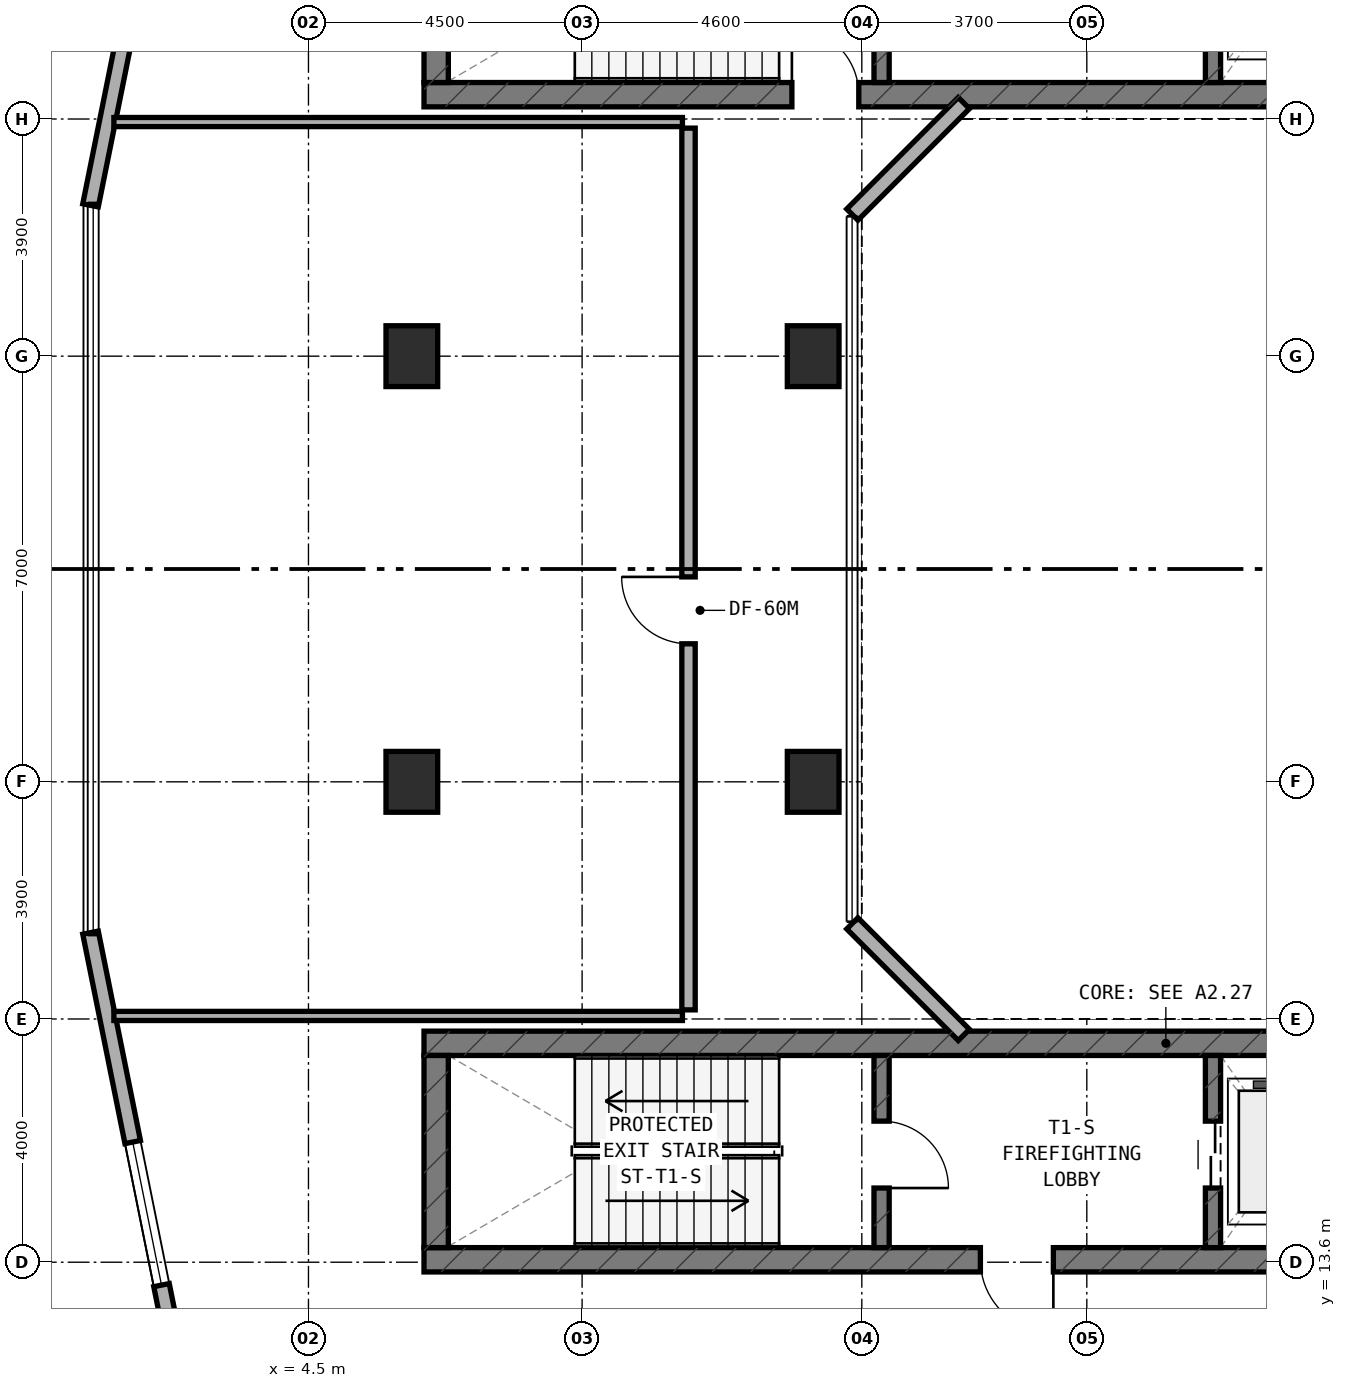
"""IFC4 building model, lengths in metres.
Left out: names, types, materials, properties, quantities, classifications, styles, units other than length and angle.
Written with IfcOpenShell. Run it as: python <this file> out.ifc"""

import sys

from ifc_helpers import new_model, si_unit, direction, frame, frame_2d, origin, origin_2d, place, context, subcontext, project, spatial, rectangle, extrude, element, fill, save


model = new_model("IFC4")
c1 = context("Model", 3, precision=1e-05, world=origin(), true_north=direction((0.0, 1.0)))
c2 = subcontext(c1, "Body", "Model", "MODEL_VIEW")
j1 = project(units=[si_unit("LENGTHUNIT", "METRE"), si_unit("PLANEANGLEUNIT", "RADIAN")], contexts=[c1])
p1 = place(None, origin())
s1 = spatial("IfcSite", under=j1, at=p1, CompositionType="ELEMENT")
p2 = place(p1, origin())
s2 = spatial("IfcBuilding", under=s1, at=p2, CompositionType="ELEMENT")
p3 = place(p2, frame((0.0, 0.0, 119.5)))
s3 = spatial("IfcBuildingStorey", under=s2, at=p3, CompositionType="ELEMENT", Elevation=119.5)
p4 = place(p3, frame((6.4, 32.8, 0.0), z_axis=(0.0, 0.0, 1.0), x_axis=(1.0, 0.0, 0.0)))
e1 = element("IfcWall", 1, at=p4, inside=s3, PredefinedType="SHEAR", context=c2, shape_type="SweptSolid", body=[
    extrude(rectangle(XDim=24.4, YDim=0.4, at=frame_2d((12.2, 0.0))), origin(), (0.0, 0.0, 1.0), 4.5),
])
p5 = place(p4, frame((6.05, 0.0, 0.0)))
e2 = element("IfcOpeningElement", 2, at=p5, cuts=e1, PredefinedType="OPENING", context=c2, shape_type="SweptSolid", body=[
    extrude(rectangle(XDim=1.1, YDim=2.15, at=frame_2d((0.55, 1.075))), frame((0.0, 0.21, 0.0), z_axis=(0.0, -1.0, 0.0), x_axis=(1.0, 0.0, 0.0)), (0.0, 0.0, 1.0), 0.42),
])
p6 = place(p3, frame((6.6, 33.0, 0.0), z_axis=(0.0, 0.0, 1.0), x_axis=(0.0, 1.0, 0.0)))
e3 = element("IfcWall", 3, at=p6, inside=s3, PredefinedType="SHEAR", context=c2, shape_type="SweptSolid", body=[
    extrude(rectangle(XDim=3.16, YDim=0.4, at=frame_2d((1.58, 0.0))), origin(), (0.0, 0.0, 1.0), 4.5),
])
p7 = place(p3, frame((13.925, 33.0, 0.0), z_axis=(0.0, 0.0, 1.0), x_axis=(0.0, 1.0, 0.0)))
e4 = element("IfcWall", 4, at=p7, inside=s3, PredefinedType="STANDARD", context=c2, shape_type="SweptSolid", body=[
    extrude(rectangle(XDim=3.16, YDim=0.25, at=frame_2d((1.58, 0.0))), origin(), (0.0, 0.0, 1.0), 4.22),
])
p8 = place(p7, frame((0.98, 0.0, 0.0)))
e5 = element("IfcOpeningElement", 5, at=p8, cuts=e4, PredefinedType="OPENING", context=c2, shape_type="SweptSolid", body=[
    extrude(rectangle(XDim=1.1, YDim=2.15, at=frame_2d((0.55, 1.075))), frame((0.0, 0.135, 0.0), z_axis=(0.0, -1.0, 0.0), x_axis=(1.0, 0.0, 0.0)), (0.0, 0.0, 1.0), 0.27),
])
p9 = place(p3, frame((19.375, 33.0, 0.0), z_axis=(0.0, 0.0, 1.0), x_axis=(0.0, 1.0, 0.0)))
e6 = element("IfcWall", 6, at=p9, inside=s3, PredefinedType="STANDARD", context=c2, shape_type="SweptSolid", body=[
    extrude(rectangle(XDim=3.16, YDim=0.25, at=frame_2d((1.58, 0.0))), origin(), (0.0, 0.0, 1.0), 4.22),
])
p10 = place(p9, frame((0.98, 0.0, 0.0)))
e7 = element("IfcOpeningElement", 7, at=p10, cuts=e6, PredefinedType="OPENING", context=c2, shape_type="SweptSolid", body=[
    extrude(rectangle(XDim=1.1, YDim=2.15, at=frame_2d((0.55, 1.075))), frame((0.0, 0.135, 0.0), z_axis=(0.0, -1.0, 0.0), x_axis=(1.0, 0.0, 0.0)), (0.0, 0.0, 1.0), 0.27),
])
p11 = place(p3, frame((6.4, 13.64, 0.0), z_axis=(0.0, 0.0, 1.0), x_axis=(1.0, 0.0, 0.0)))
e8 = element("IfcWall", 8, at=p11, inside=s3, PredefinedType="SHEAR", context=c2, shape_type="SweptSolid", body=[
    extrude(rectangle(XDim=24.4, YDim=0.4, at=frame_2d((12.2, 0.0))), origin(), (0.0, 0.0, 1.0), 4.5),
])
p12 = place(p11, frame((9.15, 0.0, 0.0)))
e9 = element("IfcOpeningElement", 9, at=p12, cuts=e8, PredefinedType="OPENING", context=c2, shape_type="SweptSolid", body=[
    extrude(rectangle(XDim=1.2, YDim=2.15, at=frame_2d((0.6, 1.075))), frame((0.0, 0.21, 0.0), z_axis=(0.0, -1.0, 0.0), x_axis=(1.0, 0.0, 0.0)), (0.0, 0.0, 1.0), 0.42),
])
p13 = place(p11, frame((16.94, 0.0, 0.0)))
e10 = element("IfcOpeningElement", 10, at=p13, cuts=e8, PredefinedType="OPENING", context=c2, shape_type="SweptSolid", body=[
    extrude(rectangle(XDim=0.85, YDim=2.1, at=frame_2d((0.425, 1.05))), frame((0.0, 0.21, 0.0), z_axis=(0.0, -1.0, 0.0), x_axis=(1.0, 0.0, 0.0)), (0.0, 0.0, 1.0), 0.42),
])
p14 = place(p11, frame((18.783, 0.0, 0.0)))
e11 = element("IfcOpeningElement", 11, at=p14, cuts=e8, PredefinedType="OPENING", context=c2, shape_type="SweptSolid", body=[
    extrude(rectangle(XDim=1.1, YDim=2.15, at=frame_2d((0.55, 1.075))), frame((0.0, 0.21, 0.0), z_axis=(0.0, -1.0, 0.0), x_axis=(1.0, 0.0, 0.0)), (0.0, 0.0, 1.0), 0.42),
])
p15 = place(p11, frame((20.65, 0.0, 0.0)))
e12 = element("IfcOpeningElement", 12, at=p15, cuts=e8, PredefinedType="OPENING", context=c2, shape_type="SweptSolid", body=[
    extrude(rectangle(XDim=1.1, YDim=2.15, at=frame_2d((0.55, 1.075))), frame((0.0, 0.21, 0.0), z_axis=(0.0, -1.0, 0.0), x_axis=(1.0, 0.0, 0.0)), (0.0, 0.0, 1.0), 0.42),
])
p16 = place(p11, frame((22.517, 0.0, 0.0)))
e13 = element("IfcOpeningElement", 13, at=p16, cuts=e8, PredefinedType="OPENING", context=c2, shape_type="SweptSolid", body=[
    extrude(rectangle(XDim=1.1, YDim=2.15, at=frame_2d((0.55, 1.075))), frame((0.0, 0.21, 0.0), z_axis=(0.0, -1.0, 0.0), x_axis=(1.0, 0.0, 0.0)), (0.0, 0.0, 1.0), 0.42),
])
p17 = place(p3, frame((6.4, 17.2, 0.0), z_axis=(0.0, 0.0, 1.0), x_axis=(1.0, 0.0, 0.0)))
e14 = element("IfcWall", 14, at=p17, inside=s3, PredefinedType="SHEAR", context=c2, shape_type="SweptSolid", body=[
    extrude(rectangle(XDim=24.4, YDim=0.4, at=frame_2d((12.2, 0.0))), origin(), (0.0, 0.0, 1.0), 4.5),
])
p18 = place(p3, frame((6.6, 13.84, 0.0), z_axis=(0.0, 0.0, 1.0), x_axis=(0.0, 1.0, 0.0)))
e15 = element("IfcWall", 15, at=p18, inside=s3, PredefinedType="SHEAR", context=c2, shape_type="SweptSolid", body=[
    extrude(rectangle(XDim=3.16, YDim=0.4, at=frame_2d((1.58, 0.0))), origin(), (0.0, 0.0, 1.0), 4.5),
])
p19 = place(p3, frame((13.925, 13.84, 0.0), z_axis=(0.0, 0.0, 1.0), x_axis=(0.0, 1.0, 0.0)))
e16 = element("IfcWall", 16, at=p19, inside=s3, PredefinedType="STANDARD", context=c2, shape_type="SweptSolid", body=[
    extrude(rectangle(XDim=3.16, YDim=0.25, at=frame_2d((1.58, 0.0))), origin(), (0.0, 0.0, 1.0), 4.22),
])
p20 = place(p19, frame((0.98, 0.0, 0.0)))
e17 = element("IfcOpeningElement", 17, at=p20, cuts=e16, PredefinedType="OPENING", context=c2, shape_type="SweptSolid", body=[
    extrude(rectangle(XDim=1.1, YDim=2.15, at=frame_2d((0.55, 1.075))), frame((0.0, 0.135, 0.0), z_axis=(0.0, -1.0, 0.0), x_axis=(1.0, 0.0, 0.0)), (0.0, 0.0, 1.0), 0.27),
])
p21 = place(p3, frame((19.375, 13.84, 0.0), z_axis=(0.0, 0.0, 1.0), x_axis=(0.0, 1.0, 0.0)))
e18 = element("IfcWall", 18, at=p21, inside=s3, PredefinedType="STANDARD", context=c2, shape_type="SweptSolid", body=[
    extrude(rectangle(XDim=3.16, YDim=0.25, at=frame_2d((1.58, 0.0))), origin(), (0.0, 0.0, 1.0), 4.22),
])
p22 = place(p21, frame((0.98, 0.0, 0.0)))
e19 = element("IfcOpeningElement", 19, at=p22, cuts=e18, PredefinedType="OPENING", context=c2, shape_type="SweptSolid", body=[
    extrude(rectangle(XDim=1.1, YDim=2.15, at=frame_2d((0.55, 1.075))), frame((0.0, 0.135, 0.0), z_axis=(0.0, -1.0, 0.0), x_axis=(1.0, 0.0, 0.0)), (0.0, 0.0, 1.0), 0.27),
])
for number, where, z_axis, x_axis in (
    (20, (6.2, 21.5, 0.0), (0.0, 0.0, 1.0), (1.0, 0.0, 0.0)),
    (21, (6.2, 28.5, 0.0), (0.0, 0.0, 1.0), (1.0, 0.0, 0.0)),
    (22, (12.8, 21.5, 0.0), (0.0, 0.0, 1.0), (1.0, 0.0, 0.0)),
    (23, (12.8, 28.5, 0.0), (0.0, 0.0, 1.0), (1.0, 0.0, 0.0)),
):
    element("IfcColumn", number, at=place(p3, frame(where, z_axis=z_axis, x_axis=x_axis)), inside=s3, PredefinedType="COLUMN", context=c2, shape_type="SweptSolid", body=[
        extrude(rectangle(XDim=0.85, YDim=1.0, at=origin_2d()), origin(), (0.0, 0.0, 1.0), 4.5),
    ])
p23 = place(p3, frame((2.729, 39.982, 0.0), z_axis=(0.0, 0.0, 1.0), x_axis=(-0.197435082048, -0.980315963543, 0.0)))
e24 = element("IfcWall", 24, at=p23, inside=s3, PredefinedType="STANDARD", context=c2, shape_type="SweptSolid", body=[
    extrude(rectangle(XDim=9.183, YDim=0.26, at=frame_2d((4.591, 0.0))), origin(), (0.0, 0.0, 1.0), 4.22),
])
p24 = place(p23, frame((3.27, 0.0, 0.8)))
e25 = element("IfcOpeningElement", 25, at=p24, cuts=e24, PredefinedType="OPENING", context=c2, shape_type="SweptSolid", body=[
    extrude(rectangle(XDim=2.4, YDim=1.6, at=frame_2d((1.2, 0.8))), frame((0.0, 0.14, 0.0), z_axis=(0.0, -1.0, 0.0), x_axis=(1.0, 0.0, 0.0)), (0.0, 0.0, 1.0), 0.28),
])
p25 = place(p3, frame((0.916, 19.02, 0.0), z_axis=(0.0, 0.0, 1.0), x_axis=(0.197435082048, -0.980315963543, 0.0)))
e26 = element("IfcWall", 26, at=p25, inside=s3, PredefinedType="STANDARD", context=c2, shape_type="SweptSolid", body=[
    extrude(rectangle(XDim=9.183, YDim=0.26, at=frame_2d((4.591, 0.0))), origin(), (0.0, 0.0, 1.0), 4.22),
])
p26 = place(p25, frame((3.513, 0.0, 0.8)))
e27 = element("IfcOpeningElement", 27, at=p26, cuts=e26, PredefinedType="OPENING", context=c2, shape_type="SweptSolid", body=[
    extrude(rectangle(XDim=2.4, YDim=1.6, at=frame_2d((1.2, 0.8))), frame((0.0, 0.14, 0.0), z_axis=(0.0, -1.0, 0.0), x_axis=(1.0, 0.0, 0.0)), (0.0, 0.0, 1.0), 0.28),
])
for number, where, z_axis, x_axis in (
    (28, (15.278, 32.662, 0.0), (0.0, 0.0, 1.0), (-0.707, -0.707, 0.0)),
    (29, (13.444, 19.172, 0.0), (0.0, 0.0, 1.0), (0.707, -0.707, 0.0)),
):
    element("IfcWall", number, at=place(p3, frame(where, z_axis=z_axis, x_axis=x_axis)), inside=s3, PredefinedType="STANDARD", context=c2, shape_type="SweptSolid", body=[
        extrude(rectangle(XDim=2.594, YDim=0.26, at=frame_2d((1.297, 0.0))), origin(), (0.0, 0.0, 1.0), 4.22),
    ])
for number, where, z_axis, x_axis in (
    (30, (1.3, 17.65, 0.0), (0.0, 0.0, 1.0), (1.0, 0.0, 0.0)),
    (31, (1.3, 32.35, 0.0), (0.0, 0.0, 1.0), (1.0, 0.0, 0.0)),
):
    element("IfcWall", number, at=place(p3, frame(where, z_axis=z_axis, x_axis=x_axis)), inside=s3, PredefinedType="PARTITIONING", context=c2, shape_type="SweptSolid", body=[
        extrude(rectangle(XDim=9.35, YDim=0.15, at=frame_2d((4.675, 0.0))), origin(), (0.0, 0.0, 1.0), 4.22),
    ])
p27 = place(p3, frame((10.75, 17.75, 0.0), z_axis=(0.0, 0.0, 1.0), x_axis=(0.0, 1.0, 0.0)))
e32 = element("IfcWall", 32, at=p27, inside=s3, PredefinedType="SOLIDWALL", context=c2, shape_type="SweptSolid", body=[
    extrude(rectangle(XDim=14.5, YDim=0.22, at=frame_2d((7.25, 0.0))), origin(), (0.0, 0.0, 1.0), 3.695),
])
p28 = place(p27, frame((6.02, 0.0, 0.0)))
e33 = element("IfcOpeningElement", 33, at=p28, cuts=e32, PredefinedType="OPENING", context=c2, shape_type="SweptSolid", body=[
    extrude(rectangle(XDim=1.1, YDim=2.1, at=frame_2d((0.55, 1.05))), frame((0.0, 0.12, 0.0), z_axis=(0.0, -1.0, 0.0), x_axis=(1.0, 0.0, 0.0)), (0.0, 0.0, 1.0), 0.24),
])
p29 = place(p26, origin())
e34 = element("IfcWindow", 34, at=p29, inside=s3, PartitioningType="SINGLE_PANEL", PredefinedType="WINDOW", context=c2, shape_type="SweptSolid", body=[
    extrude(rectangle(XDim=2.4, YDim=1.6, at=frame_2d((1.2, 0.8))), frame((0.0, 0.03, 0.0), z_axis=(0.0, -1.0, 0.0), x_axis=(1.0, 0.0, 0.0)), (0.0, 0.0, 1.0), 0.06),
])
fill(e27, e34)
p30 = place(p20, frame((1.1, 0.0, 0.0), z_axis=(0.0, 0.0, 1.0), x_axis=(-1.0, 0.0, 0.0)))
e35 = element("IfcDoor", 35, at=p30, inside=s3, OperationType="SINGLE_SWING_RIGHT", PredefinedType="DOOR", context=c2, shape_type="SweptSolid", body=[
    extrude(rectangle(XDim=1.1, YDim=2.15, at=frame_2d((0.55, 1.075))), frame((0.0, 0.025, 0.0), z_axis=(0.0, -1.0, 0.0), x_axis=(1.0, 0.0, 0.0)), (0.0, 0.0, 1.0), 0.05),
])
fill(e17, e35)
p31 = place(p12, frame((1.2, 0.0, 0.0), z_axis=(0.0, 0.0, 1.0), x_axis=(-1.0, 0.0, 0.0)))
e36 = element("IfcDoor", 36, at=p31, inside=s3, OperationType="SINGLE_SWING_LEFT", PredefinedType="DOOR", context=c2, shape_type="SweptSolid", body=[
    extrude(rectangle(XDim=1.2, YDim=2.15, at=frame_2d((0.6, 1.075))), frame((0.0, 0.025, 0.0), z_axis=(0.0, -1.0, 0.0), x_axis=(1.0, 0.0, 0.0)), (0.0, 0.0, 1.0), 0.05),
])
fill(e9, e36)
p32 = place(p22, origin())
e37 = element("IfcDoor", 37, at=p32, inside=s3, OperationType="DOUBLE_DOOR_SLIDING", PredefinedType="DOOR", context=c2, shape_type="SweptSolid", body=[
    extrude(rectangle(XDim=1.1, YDim=2.15, at=frame_2d((0.55, 1.075))), frame((0.0, 0.025, 0.0), z_axis=(0.0, -1.0, 0.0), x_axis=(1.0, 0.0, 0.0)), (0.0, 0.0, 1.0), 0.05),
])
fill(e19, e37)
p33 = place(p5, origin())
e38 = element("IfcDoor", 38, at=p33, inside=s3, OperationType="SINGLE_SWING_LEFT", PredefinedType="DOOR", context=c2, shape_type="SweptSolid", body=[
    extrude(rectangle(XDim=1.1, YDim=2.15, at=frame_2d((0.55, 1.075))), frame((0.0, 0.025, 0.0), z_axis=(0.0, -1.0, 0.0), x_axis=(1.0, 0.0, 0.0)), (0.0, 0.0, 1.0), 0.05),
])
fill(e2, e38)
p34 = place(p28, origin())
e39 = element("IfcDoor", 39, at=p34, inside=s3, OperationType="SINGLE_SWING_RIGHT", PredefinedType="DOOR", context=c2, shape_type="SweptSolid", body=[
    extrude(rectangle(XDim=1.1, YDim=2.1, at=frame_2d((0.55, 1.05))), frame((0.0, 0.025, 0.0), z_axis=(0.0, -1.0, 0.0), x_axis=(1.0, 0.0, 0.0)), (0.0, 0.0, 1.0), 0.05),
])
fill(e33, e39)
save(model, sys.argv[1])
